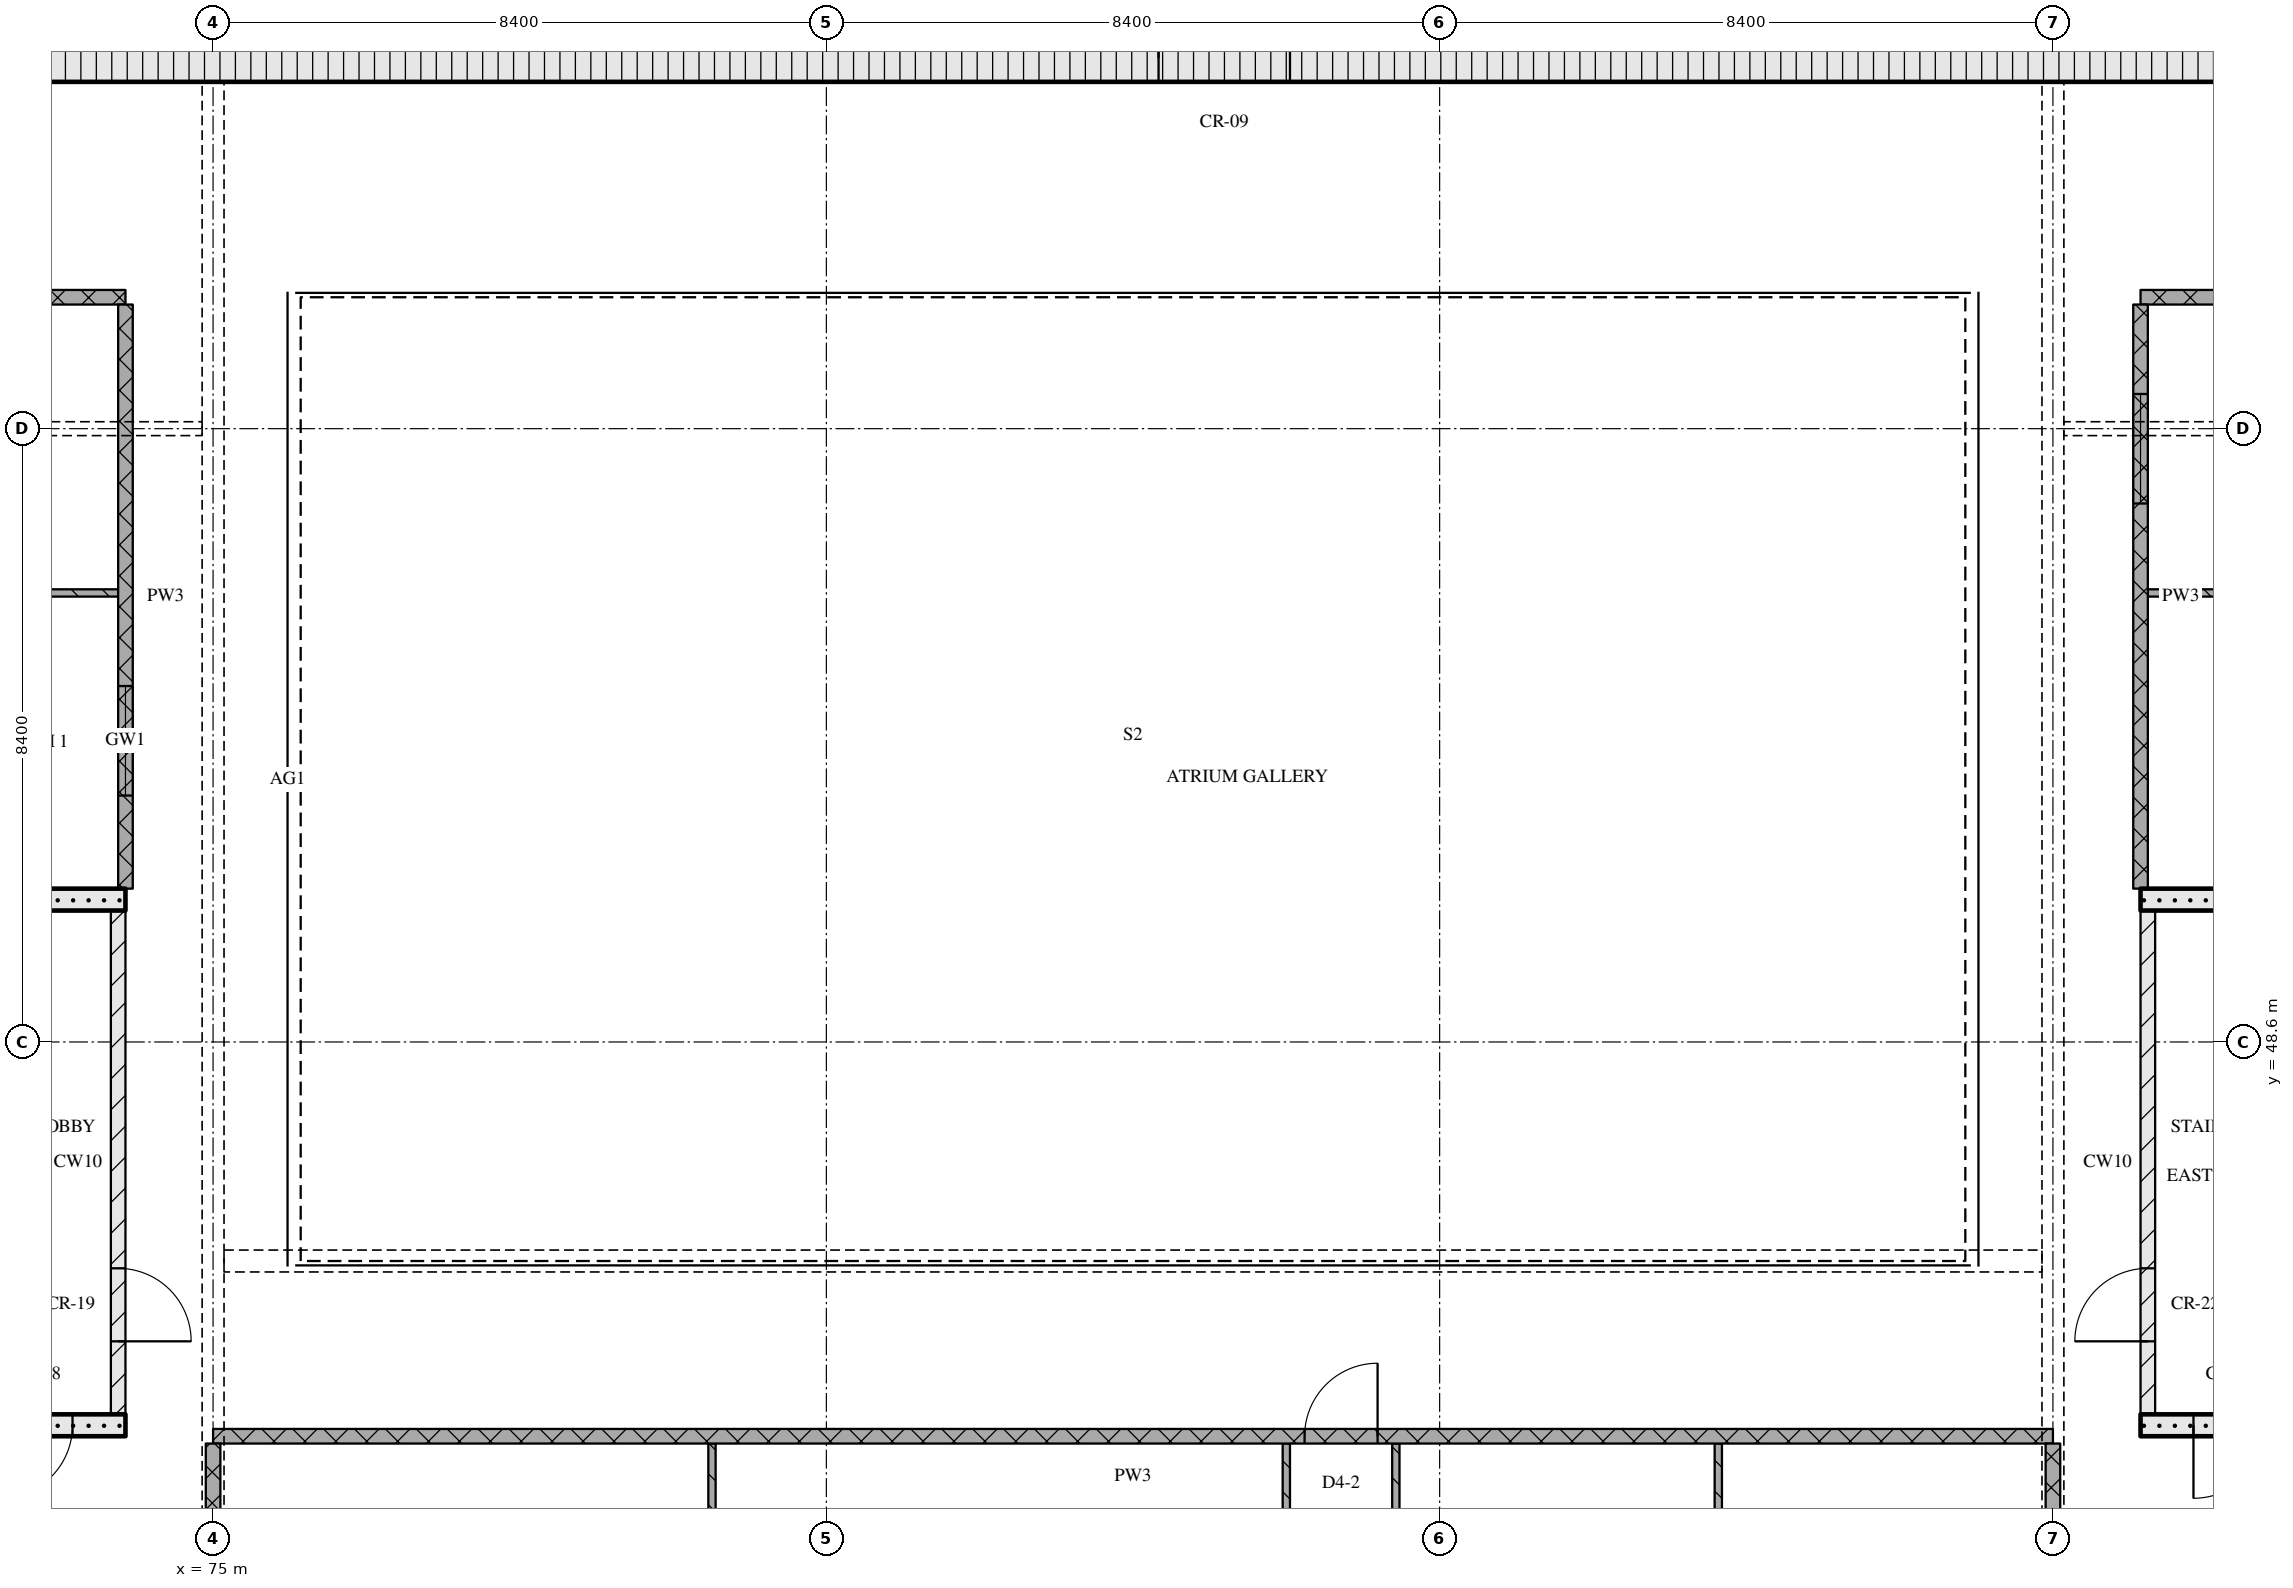
"""IFC4 building model, lengths in metres.
Left out: names, types, materials, properties, quantities, classifications, styles, units other than length and angle.
Written with IfcOpenShell. Run it as: python <this file> out.ifc"""

import sys

from ifc_helpers import new_model, si_unit, direction, frame, frame_2d, origin, place, context, subcontext, project, spatial, rectangle, extrude, element, fill, save


model = new_model("IFC4")
c1 = context("Model", 3, precision=1e-05, world=origin(), true_north=direction((0.0, 1.0)))
c2 = subcontext(c1, "Body", "Model", "MODEL_VIEW")
j1 = project(units=[si_unit("LENGTHUNIT", "METRE"), si_unit("PLANEANGLEUNIT", "RADIAN")], contexts=[c1])
p1 = place(None, origin())
s1 = spatial("IfcSite", under=j1, at=p1, CompositionType="ELEMENT")
p2 = place(p1, origin())
s2 = spatial("IfcBuilding", under=s1, at=p2, CompositionType="ELEMENT")
p3 = place(p2, frame((0.0, 0.0, 241.5)))
s3 = spatial("IfcBuildingStorey", under=s2, at=p3, CompositionType="ELEMENT", Elevation=241.5)
p4 = place(p3, frame((67.15, 62.075, 0.0), z_axis=(0.0, 0.0, 1.0), x_axis=(1.0, 0.0, 0.0)))
e1 = element("IfcWall", 1, at=p4, inside=s3, PredefinedType="SOLIDWALL", context=c2, shape_type="SweptSolid", body=[
    extrude(rectangle(XDim=40.9, YDim=0.65, at=frame_2d((20.45, 0.0))), origin(), (0.0, 0.0, 1.0), 3.32),
])
p5 = place(p4, frame((20.8, 0.0, 0.0)))
e2 = element("IfcOpeningElement", 2, at=p5, cuts=e1, PredefinedType="OPENING", context=c2, shape_type="SweptSolid", body=[
    extrude(rectangle(XDim=1.8, YDim=2.1, at=frame_2d((0.9, 1.05))), frame((0.0, 0.335, 0.0), z_axis=(0.0, -1.0, 0.0), x_axis=(1.0, 0.0, 0.0)), (0.0, 0.0, 1.0), 0.67),
])
p6 = place(p3, frame((68.2, 43.35, 0.0), z_axis=(0.0, 0.0, 1.0), x_axis=(1.0, 0.0, 0.0)))
e3 = element("IfcWall", 3, at=p6, inside=s3, PredefinedType="SOLIDWALL", context=c2, shape_type="SweptSolid", body=[
    extrude(rectangle(XDim=5.6, YDim=0.3, at=frame_2d((2.8, 0.0))), origin(), (0.0, 0.0, 1.0), 3.32),
])
p7 = place(p6, frame((3.875, 0.0, 0.0)))
e4 = element("IfcOpeningElement", 4, at=p7, cuts=e3, PredefinedType="OPENING", context=c2, shape_type="SweptSolid", body=[
    extrude(rectangle(XDim=1.0, YDim=2.1, at=frame_2d((0.5, 1.05))), frame((0.0, 0.16, 0.0), z_axis=(0.0, -1.0, 0.0), x_axis=(1.0, 0.0, 0.0)), (0.0, 0.0, 1.0), 0.32),
])
p8 = place(p3, frame((73.7, 43.5, 0.0), z_axis=(0.0, 0.0, 1.0), x_axis=(0.0, 1.0, 0.0)))
e5 = element("IfcWall", 5, at=p8, inside=s3, PredefinedType="PARTITIONING", context=c2, shape_type="SweptSolid", body=[
    extrude(rectangle(XDim=6.9, YDim=0.2, at=frame_2d((3.45, 0.0))), origin(), (0.0, 0.0, 1.0), 3.32),
])
p9 = place(p8, frame((1.0, 0.0, 0.0)))
e6 = element("IfcOpeningElement", 6, at=p9, cuts=e5, PredefinedType="OPENING", context=c2, shape_type="SweptSolid", body=[
    extrude(rectangle(XDim=1.0, YDim=2.1, at=frame_2d((0.5, 1.05))), frame((0.0, 0.11, 0.0), z_axis=(0.0, -1.0, 0.0), x_axis=(1.0, 0.0, 0.0)), (0.0, 0.0, 1.0), 0.22),
])
p10 = place(p3, frame((68.2, 50.55, 0.0), z_axis=(0.0, 0.0, 1.0), x_axis=(1.0, 0.0, 0.0)))
e7 = element("IfcWall", 7, at=p10, inside=s3, PredefinedType="SOLIDWALL", context=c2, shape_type="SweptSolid", body=[
    extrude(rectangle(XDim=5.6, YDim=0.3, at=frame_2d((2.8, 0.0))), origin(), (0.0, 0.0, 1.0), 3.32),
])
p11 = place(p3, frame((101.4, 43.35, 0.0), z_axis=(0.0, 0.0, 1.0), x_axis=(1.0, 0.0, 0.0)))
e8 = element("IfcWall", 8, at=p11, inside=s3, PredefinedType="SOLIDWALL", context=c2, shape_type="SweptSolid", body=[
    extrude(rectangle(XDim=5.6, YDim=0.3, at=frame_2d((2.8, 0.0))), origin(), (0.0, 0.0, 1.0), 3.32),
])
p12 = place(p11, frame((0.725, 0.0, 0.0)))
e9 = element("IfcOpeningElement", 9, at=p12, cuts=e8, PredefinedType="OPENING", context=c2, shape_type="SweptSolid", body=[
    extrude(rectangle(XDim=1.0, YDim=2.1, at=frame_2d((0.5, 1.05))), frame((0.0, 0.16, 0.0), z_axis=(0.0, -1.0, 0.0), x_axis=(1.0, 0.0, 0.0)), (0.0, 0.0, 1.0), 0.32),
])
p13 = place(p3, frame((101.5, 43.5, 0.0), z_axis=(0.0, 0.0, 1.0), x_axis=(0.0, 1.0, 0.0)))
e10 = element("IfcWall", 10, at=p13, inside=s3, PredefinedType="PARTITIONING", context=c2, shape_type="SweptSolid", body=[
    extrude(rectangle(XDim=6.9, YDim=0.2, at=frame_2d((3.45, 0.0))), origin(), (0.0, 0.0, 1.0), 3.32),
])
p14 = place(p13, frame((1.0, 0.0, 0.0)))
e11 = element("IfcOpeningElement", 11, at=p14, cuts=e10, PredefinedType="OPENING", context=c2, shape_type="SweptSolid", body=[
    extrude(rectangle(XDim=1.0, YDim=2.1, at=frame_2d((0.5, 1.05))), frame((0.0, 0.11, 0.0), z_axis=(0.0, -1.0, 0.0), x_axis=(1.0, 0.0, 0.0)), (0.0, 0.0, 1.0), 0.22),
])
p15 = place(p3, frame((101.4, 50.55, 0.0), z_axis=(0.0, 0.0, 1.0), x_axis=(1.0, 0.0, 0.0)))
e12 = element("IfcWall", 12, at=p15, inside=s3, PredefinedType="SOLIDWALL", context=c2, shape_type="SweptSolid", body=[
    extrude(rectangle(XDim=5.6, YDim=0.3, at=frame_2d((2.8, 0.0))), origin(), (0.0, 0.0, 1.0), 3.32),
])
p16 = place(p3, frame((100.2, 43.2, 0.0), z_axis=(0.0, 0.0, 1.0), x_axis=(-1.0, 0.0, 0.0)))
e13 = element("IfcWall", 13, at=p16, inside=s3, PredefinedType="PARTITIONING", context=c2, shape_type="SweptSolid", body=[
    extrude(rectangle(XDim=25.2, YDim=0.2, at=frame_2d((12.6, 0.0))), origin(), (0.0, 0.0, 1.0), 3.32),
])
p17 = place(p16, frame((9.25, 0.0, 0.0)))
e14 = element("IfcOpeningElement", 14, at=p17, cuts=e13, PredefinedType="OPENING", context=c2, shape_type="SweptSolid", body=[
    extrude(rectangle(XDim=1.0, YDim=2.1, at=frame_2d((0.5, 1.05))), frame((0.0, 0.11, 0.0), z_axis=(0.0, -1.0, 0.0), x_axis=(1.0, 0.0, 0.0)), (0.0, 0.0, 1.0), 0.22),
])
p18 = place(p3, frame((73.7, 54.75, 0.0), z_axis=(0.0, 0.0, 1.0), x_axis=(-1.0, 0.0, 0.0)))
e15 = element("IfcWall", 15, at=p18, inside=s3, PredefinedType="PARTITIONING", context=c2, shape_type="SweptSolid", body=[
    extrude(rectangle(XDim=4.4, YDim=0.1, at=frame_2d((2.2, 0.0))), origin(), (0.0, 0.0, 1.0), 3.32),
])
p19 = place(p18, frame((1.7, 0.0, 0.0)))
e16 = element("IfcOpeningElement", 16, at=p19, cuts=e15, PredefinedType="OPENING", context=c2, shape_type="SweptSolid", body=[
    extrude(rectangle(XDim=0.9, YDim=2.1, at=frame_2d((0.45, 1.05))), frame((0.0, 0.06, 0.0), z_axis=(0.0, -1.0, 0.0), x_axis=(1.0, 0.0, 0.0)), (0.0, 0.0, 1.0), 0.12),
])
p20 = place(p3, frame((101.5, 54.75, 0.0), z_axis=(0.0, 0.0, 1.0), x_axis=(1.0, 0.0, 0.0)))
e17 = element("IfcWall", 17, at=p20, inside=s3, PredefinedType="PARTITIONING", context=c2, shape_type="SweptSolid", body=[
    extrude(rectangle(XDim=5.3, YDim=0.1, at=frame_2d((2.65, 0.0))), origin(), (0.0, 0.0, 1.0), 3.32),
])
p21 = place(p20, frame((2.15, 0.0, 0.0)))
e18 = element("IfcOpeningElement", 18, at=p21, cuts=e17, PredefinedType="OPENING", context=c2, shape_type="SweptSolid", body=[
    extrude(rectangle(XDim=0.9, YDim=2.1, at=frame_2d((0.45, 1.05))), frame((0.0, 0.06, 0.0), z_axis=(0.0, -1.0, 0.0), x_axis=(1.0, 0.0, 0.0)), (0.0, 0.0, 1.0), 0.12),
])
for number, where, z_axis, x_axis in (
    (19, (63.0, 58.8, 0.0), (0.0, 0.0, 1.0), (1.0, 0.0, 0.0)),
    (20, (101.4, 58.8, 0.0), (0.0, 0.0, 1.0), (1.0, 0.0, 0.0)),
):
    element("IfcWall", number, at=place(p3, frame(where, z_axis=z_axis, x_axis=x_axis)), inside=s3, PredefinedType="PARTITIONING", context=c2, shape_type="SweptSolid", body=[
        extrude(rectangle(XDim=10.8, YDim=0.2, at=frame_2d((5.4, 0.0))), origin(), (0.0, 0.0, 1.0), 3.32),
    ])
p22 = place(p3, frame((73.8, 58.7, 0.0), z_axis=(0.0, 0.0, 1.0), x_axis=(0.0, -1.0, 0.0)))
e21 = element("IfcWall", 21, at=p22, inside=s3, PredefinedType="PARTITIONING", context=c2, shape_type="SweptSolid", body=[
    extrude(rectangle(XDim=8.0, YDim=0.2, at=frame_2d((4.0, 0.0))), origin(), (0.0, 0.0, 1.0), 3.32),
])
p23 = place(p22, frame((5.225, 0.0, 0.9)))
e22 = element("IfcOpeningElement", 22, at=p23, cuts=e21, PredefinedType="OPENING", context=c2, shape_type="SweptSolid", body=[
    extrude(rectangle(XDim=1.5, YDim=1.5, at=frame_2d((0.75, 0.75))), frame((0.0, 0.11, 0.0), z_axis=(0.0, -1.0, 0.0), x_axis=(1.0, 0.0, 0.0)), (0.0, 0.0, 1.0), 0.22),
])
p24 = place(p3, frame((75.0, 43.1, 0.0), z_axis=(0.0, 0.0, 1.0), x_axis=(0.0, -1.0, 0.0)))
e23 = element("IfcWall", 23, at=p24, inside=s3, PredefinedType="PARTITIONING", context=c2, shape_type="SweptSolid", body=[
    extrude(rectangle(XDim=2.2, YDim=0.2, at=frame_2d((1.1, 0.0))), origin(), (0.0, 0.0, 1.0), 2.53),
])
for number, where, z_axis, x_axis in (
    (24, (81.833, 43.1, 0.0), (0.0, 0.0, 1.0), (0.0, -1.0, 0.0)),
    (25, (89.7, 43.1, 0.0), (0.0, 0.0, 1.0), (0.0, -1.0, 0.0)),
):
    element("IfcWall", number, at=place(p3, frame(where, z_axis=z_axis, x_axis=x_axis)), inside=s3, PredefinedType="PARTITIONING", context=c2, shape_type="SweptSolid", body=[
        extrude(rectangle(XDim=5.85, YDim=0.1, at=frame_2d((2.925, 0.0))), origin(), (0.0, 0.0, 1.0), 3.32),
    ])
p25 = place(p3, frame((91.2, 43.1, 0.0), z_axis=(0.0, 0.0, 1.0), x_axis=(0.0, -1.0, 0.0)))
e26 = element("IfcWall", 26, at=p25, inside=s3, PredefinedType="PARTITIONING", context=c2, shape_type="SweptSolid", body=[
    extrude(rectangle(XDim=5.85, YDim=0.1, at=frame_2d((2.925, 0.0))), origin(), (0.0, 0.0, 1.0), 3.32),
])
p26 = place(p25, frame((1.75, 0.0, 0.0)))
e27 = element("IfcOpeningElement", 27, at=p26, cuts=e26, PredefinedType="OPENING", context=c2, shape_type="SweptSolid", body=[
    extrude(rectangle(XDim=0.8, YDim=2.1, at=frame_2d((0.4, 1.05))), frame((0.0, 0.06, 0.0), z_axis=(0.0, -1.0, 0.0), x_axis=(1.0, 0.0, 0.0)), (0.0, 0.0, 1.0), 0.12),
])
p27 = place(p3, frame((95.617, 43.1, 0.0), z_axis=(0.0, 0.0, 1.0), x_axis=(0.0, -1.0, 0.0)))
e28 = element("IfcWall", 28, at=p27, inside=s3, PredefinedType="PARTITIONING", context=c2, shape_type="SweptSolid", body=[
    extrude(rectangle(XDim=5.85, YDim=0.1, at=frame_2d((2.925, 0.0))), origin(), (0.0, 0.0, 1.0), 3.32),
])
p28 = place(p3, frame((100.2, 43.1, 0.0), z_axis=(0.0, 0.0, 1.0), x_axis=(0.0, -1.0, 0.0)))
e29 = element("IfcWall", 29, at=p28, inside=s3, PredefinedType="PARTITIONING", context=c2, shape_type="SweptSolid", body=[
    extrude(rectangle(XDim=2.2, YDim=0.2, at=frame_2d((1.1, 0.0))), origin(), (0.0, 0.0, 1.0), 2.53),
])
p29 = place(p3, frame((101.4, 58.7, 0.0), z_axis=(0.0, 0.0, 1.0), x_axis=(0.0, -1.0, 0.0)))
e30 = element("IfcWall", 30, at=p29, inside=s3, PredefinedType="PARTITIONING", context=c2, shape_type="SweptSolid", body=[
    extrude(rectangle(XDim=8.0, YDim=0.2, at=frame_2d((4.0, 0.0))), origin(), (0.0, 0.0, 1.0), 3.32),
])
p30 = place(p29, frame((1.225, 0.0, 0.9)))
e31 = element("IfcOpeningElement", 31, at=p30, cuts=e30, PredefinedType="OPENING", context=c2, shape_type="SweptSolid", body=[
    extrude(rectangle(XDim=1.5, YDim=1.5, at=frame_2d((0.75, 0.75))), frame((0.0, 0.11, 0.0), z_axis=(0.0, -1.0, 0.0), x_axis=(1.0, 0.0, 0.0)), (0.0, 0.0, 1.0), 0.22),
])
p31 = place(p5, origin())
e32 = element("IfcDoor", 32, at=p31, inside=s3, OperationType="DOUBLE_DOOR_SINGLE_SWING", PredefinedType="DOOR", context=c2, shape_type="SweptSolid", body=[
    extrude(rectangle(XDim=1.8, YDim=2.1, at=frame_2d((0.9, 1.05))), frame((0.0, 0.025, 0.0), z_axis=(0.0, -1.0, 0.0), x_axis=(1.0, 0.0, 0.0)), (0.0, 0.0, 1.0), 0.05),
])
fill(e2, e32)
p32 = place(p7, origin())
e33 = element("IfcDoor", 33, at=p32, inside=s3, OperationType="SINGLE_SWING_RIGHT", PredefinedType="DOOR", context=c2, shape_type="SweptSolid", body=[
    extrude(rectangle(XDim=1.0, YDim=2.1, at=frame_2d((0.5, 1.05))), frame((0.0, 0.025, 0.0), z_axis=(0.0, -1.0, 0.0), x_axis=(1.0, 0.0, 0.0)), (0.0, 0.0, 1.0), 0.05),
])
fill(e4, e33)
p33 = place(p9, origin())
e34 = element("IfcDoor", 34, at=p33, inside=s3, OperationType="SINGLE_SWING_RIGHT", PredefinedType="DOOR", context=c2, shape_type="SweptSolid", body=[
    extrude(rectangle(XDim=1.0, YDim=2.1, at=frame_2d((0.5, 1.05))), frame((0.0, 0.025, 0.0), z_axis=(0.0, -1.0, 0.0), x_axis=(1.0, 0.0, 0.0)), (0.0, 0.0, 1.0), 0.05),
])
fill(e6, e34)
p34 = place(p12, origin())
e35 = element("IfcDoor", 35, at=p34, inside=s3, OperationType="SINGLE_SWING_RIGHT", PredefinedType="DOOR", context=c2, shape_type="SweptSolid", body=[
    extrude(rectangle(XDim=1.0, YDim=2.1, at=frame_2d((0.5, 1.05))), frame((0.0, 0.025, 0.0), z_axis=(0.0, -1.0, 0.0), x_axis=(1.0, 0.0, 0.0)), (0.0, 0.0, 1.0), 0.05),
])
fill(e9, e35)
p35 = place(p14, origin())
e36 = element("IfcDoor", 36, at=p35, inside=s3, OperationType="SINGLE_SWING_LEFT", PredefinedType="DOOR", context=c2, shape_type="SweptSolid", body=[
    extrude(rectangle(XDim=1.0, YDim=2.1, at=frame_2d((0.5, 1.05))), frame((0.0, 0.025, 0.0), z_axis=(0.0, -1.0, 0.0), x_axis=(1.0, 0.0, 0.0)), (0.0, 0.0, 1.0), 0.05),
])
fill(e11, e36)
p36 = place(p17, origin())
e37 = element("IfcDoor", 37, at=p36, inside=s3, OperationType="SINGLE_SWING_RIGHT", PredefinedType="DOOR", context=c2, shape_type="SweptSolid", body=[
    extrude(rectangle(XDim=1.0, YDim=2.1, at=frame_2d((0.5, 1.05))), frame((0.0, 0.025, 0.0), z_axis=(0.0, -1.0, 0.0), x_axis=(1.0, 0.0, 0.0)), (0.0, 0.0, 1.0), 0.05),
])
fill(e14, e37)
p37 = place(p23, origin())
e38 = element("IfcWindow", 38, at=p37, inside=s3, PartitioningType="SINGLE_PANEL", PredefinedType="WINDOW", context=c2, shape_type="SweptSolid", body=[
    extrude(rectangle(XDim=1.5, YDim=1.5, at=frame_2d((0.75, 0.75))), frame((0.0, 0.03, 0.0), z_axis=(0.0, -1.0, 0.0), x_axis=(1.0, 0.0, 0.0)), (0.0, 0.0, 1.0), 0.06),
])
fill(e22, e38)
p38 = place(p30, origin())
e39 = element("IfcWindow", 39, at=p38, inside=s3, PartitioningType="SINGLE_PANEL", PredefinedType="WINDOW", context=c2, shape_type="SweptSolid", body=[
    extrude(rectangle(XDim=1.5, YDim=1.5, at=frame_2d((0.75, 0.75))), frame((0.0, 0.03, 0.0), z_axis=(0.0, -1.0, 0.0), x_axis=(1.0, 0.0, 0.0)), (0.0, 0.0, 1.0), 0.06),
])
fill(e31, e39)
save(model, sys.argv[1])
